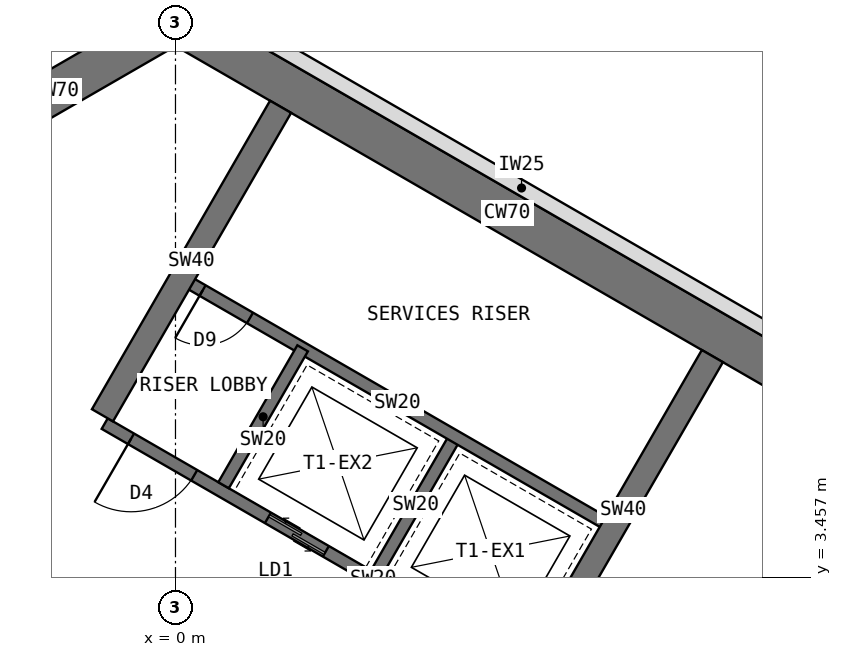
"""IFC4 building model, lengths in metres.
Left out: names, types, materials, properties, quantities, classifications, styles, units other than length and angle.
Written with IfcOpenShell. Run it as: python <this file> out.ifc"""

import sys

from ifc_helpers import new_model, si_unit, direction, frame, frame_2d, origin, place, context, subcontext, project, spatial, rectangle, extrude, element, fill, save


model = new_model("IFC4")
c1 = context("Model", 3, precision=1e-05, world=origin(), true_north=direction((0.0, 1.0)))
c2 = subcontext(c1, "Body", "Model", "MODEL_VIEW")
j1 = project(units=[si_unit("LENGTHUNIT", "METRE"), si_unit("PLANEANGLEUNIT", "RADIAN")], contexts=[c1])
p1 = place(None, origin())
s1 = spatial("IfcSite", under=j1, at=p1, CompositionType="ELEMENT")
p2 = place(p1, origin())
s2 = spatial("IfcBuilding", under=s1, at=p2, CompositionType="ELEMENT")
p3 = place(p2, origin())
s3 = spatial("IfcBuildingStorey", under=s2, at=p3, CompositionType="ELEMENT", Elevation=0.0)
p4 = place(p3, frame((10.908, 6.298, 0.0), z_axis=(0.0, 0.0, 1.0), x_axis=(-0.866021940709, 0.500005998175, 0.0)))
e1 = element("IfcWall", 1, at=p4, inside=s3, PredefinedType="SHEAR", context=c2, shape_type="SweptSolid", body=[
    extrude(rectangle(XDim=12.596, YDim=0.7, at=frame_2d((6.298, 0.0))), origin(), (0.0, 0.0, 1.0), 5.5),
])
p5 = place(p3, frame((0.0, 12.596, 0.0), z_axis=(0.0, 0.0, 1.0), x_axis=(-0.866011268655, -0.500024481964, 0.0)))
e2 = element("IfcWall", 2, at=p5, inside=s3, PredefinedType="SHEAR", context=c2, shape_type="SweptSolid", body=[
    extrude(rectangle(XDim=4.548, YDim=0.7, at=frame_2d((2.274, 0.0))), origin(), (0.0, 0.0, 1.0), 5.5),
])
p6 = place(p3, frame((5.764, 1.984, 0.0), z_axis=(0.0, 0.0, 1.0), x_axis=(-0.866026010844, 0.49999894854, 0.0)))
e3 = element("IfcWall", 3, at=p6, inside=s3, PredefinedType="SHEAR", context=c2, shape_type="SweptSolid", body=[
    extrude(rectangle(XDim=8.0, YDim=0.2, at=frame_2d((4.0, 0.0))), origin(), (0.0, 0.0, 1.0), 5.5),
])
p7 = place(p6, frame((6.3, 0.0, 0.0)))
e4 = element("IfcOpeningElement", 4, at=p7, cuts=e3, PredefinedType="OPENING", context=c2, shape_type="SweptSolid", body=[
    extrude(rectangle(XDim=1.2, YDim=2.1, at=frame_2d((0.6, 1.05))), frame((0.0, 0.11, 0.0), z_axis=(0.0, -1.0, 0.0), x_axis=(1.0, 0.0, 0.0)), (0.0, 0.0, 1.0), 0.22),
])
p8 = place(p6, frame((0.9, 0.0, 0.0)))
e5 = element("IfcOpeningElement", 5, at=p8, cuts=e3, PredefinedType="OPENING", context=c2, shape_type="SweptSolid", body=[
    extrude(rectangle(XDim=1.1, YDim=2.2, at=frame_2d((0.55, 1.1))), frame((0.0, 0.11, 0.0), z_axis=(0.0, -1.0, 0.0), x_axis=(1.0, 0.0, 0.0)), (0.0, 0.0, 1.0), 0.22),
])
p9 = place(p6, frame((3.8, 0.0, 0.0)))
e6 = element("IfcOpeningElement", 6, at=p9, cuts=e3, PredefinedType="OPENING", context=c2, shape_type="SweptSolid", body=[
    extrude(rectangle(XDim=1.1, YDim=2.2, at=frame_2d((0.55, 1.1))), frame((0.0, 0.11, 0.0), z_axis=(0.0, -1.0, 0.0), x_axis=(1.0, 0.0, 0.0)), (0.0, 0.0, 1.0), 0.22),
])
for number, where, z_axis, x_axis in (
    (7, (3.303, 3.52, 0.0), (0.0, 0.0, 1.0), (0.5, 0.866, 0.0)),
    (8, (0.791, 4.97, 0.0), (0.0, 0.0, 1.0), (0.5, 0.866, 0.0)),
):
    element("IfcWall", number, at=place(p3, frame(where, z_axis=z_axis, x_axis=x_axis)), inside=s3, PredefinedType="SHEAR", context=c2, shape_type="SweptSolid", body=[
        extrude(rectangle(XDim=2.6, YDim=0.2, at=frame_2d((1.3, 0.0))), origin(), (0.0, 0.0, 1.0), 5.5),
    ])
p10 = place(p3, frame((7.114, 4.322, 0.0), z_axis=(0.0, 0.0, 1.0), x_axis=(-0.866026010844, 0.49999894854, 0.0)))
e9 = element("IfcWall", 9, at=p10, inside=s3, PredefinedType="SHEAR", context=c2, shape_type="SweptSolid", body=[
    extrude(rectangle(XDim=8.0, YDim=0.2, at=frame_2d((4.0, 0.0))), origin(), (0.0, 0.0, 1.0), 5.5),
])
p11 = place(p10, frame((6.8, 0.0, 0.0)))
e10 = element("IfcOpeningElement", 10, at=p11, cuts=e9, PredefinedType="OPENING", context=c2, shape_type="SweptSolid", body=[
    extrude(rectangle(XDim=0.9, YDim=2.1, at=frame_2d((0.45, 1.05))), frame((0.0, 0.11, 0.0), z_axis=(0.0, -1.0, 0.0), x_axis=(1.0, 0.0, 0.0)), (0.0, 0.0, 1.0), 0.22),
])
for number, where, z_axis, x_axis in (
    (11, (-1.201, 6.12, 0.0), (0.0, 0.0, 1.0), (0.5, 0.866, 0.0)),
    (12, (5.901, 2.02, 0.0), (0.0, 0.0, 1.0), (0.5, 0.866, 0.0)),
):
    element("IfcWall", number, at=place(p3, frame(where, z_axis=z_axis, x_axis=x_axis)), inside=s3, PredefinedType="SHEAR", context=c2, shape_type="SweptSolid", body=[
        extrude(rectangle(XDim=5.858, YDim=0.4, at=frame_2d((2.929, 0.0))), origin(), (0.0, 0.0, 1.0), 5.5),
    ])
p12 = place(p3, frame((0.524, 12.842, 0.0), z_axis=(0.0, 0.0, 1.0), x_axis=(0.866027502425, -0.499996365031, 0.0)))
e13 = element("IfcWall", 13, at=p12, inside=s3, PredefinedType="STANDARD", context=c2, shape_type="SweptSolid", body=[
    extrude(rectangle(XDim=11.933, YDim=0.25, at=frame_2d((5.967, 0.0))), origin(), (0.0, 0.0, 1.0), 5.15),
])
p13 = place(p7, origin())
e14 = element("IfcDoor", 14, at=p13, inside=s3, OperationType="SINGLE_SWING_RIGHT", PredefinedType="DOOR", context=c2, shape_type="SweptSolid", body=[
    extrude(rectangle(XDim=1.2, YDim=2.1, at=frame_2d((0.6, 1.05))), frame((0.0, 0.025, 0.0), z_axis=(0.0, -1.0, 0.0), x_axis=(1.0, 0.0, 0.0)), (0.0, 0.0, 1.0), 0.05),
])
fill(e4, e14)
p14 = place(p9, origin())
e15 = element("IfcDoor", 15, at=p14, inside=s3, OperationType="DOUBLE_DOOR_SLIDING", PredefinedType="DOOR", context=c2, shape_type="SweptSolid", body=[
    extrude(rectangle(XDim=1.1, YDim=2.2, at=frame_2d((0.55, 1.1))), frame((0.0, 0.025, 0.0), z_axis=(0.0, -1.0, 0.0), x_axis=(1.0, 0.0, 0.0)), (0.0, 0.0, 1.0), 0.05),
])
fill(e6, e15)
p15 = place(p11, origin())
e16 = element("IfcDoor", 16, at=p15, inside=s3, OperationType="SINGLE_SWING_RIGHT", PredefinedType="DOOR", context=c2, shape_type="SweptSolid", body=[
    extrude(rectangle(XDim=0.9, YDim=2.1, at=frame_2d((0.45, 1.05))), frame((0.0, 0.025, 0.0), z_axis=(0.0, -1.0, 0.0), x_axis=(1.0, 0.0, 0.0)), (0.0, 0.0, 1.0), 0.05),
])
fill(e10, e16)
save(model, sys.argv[1])
